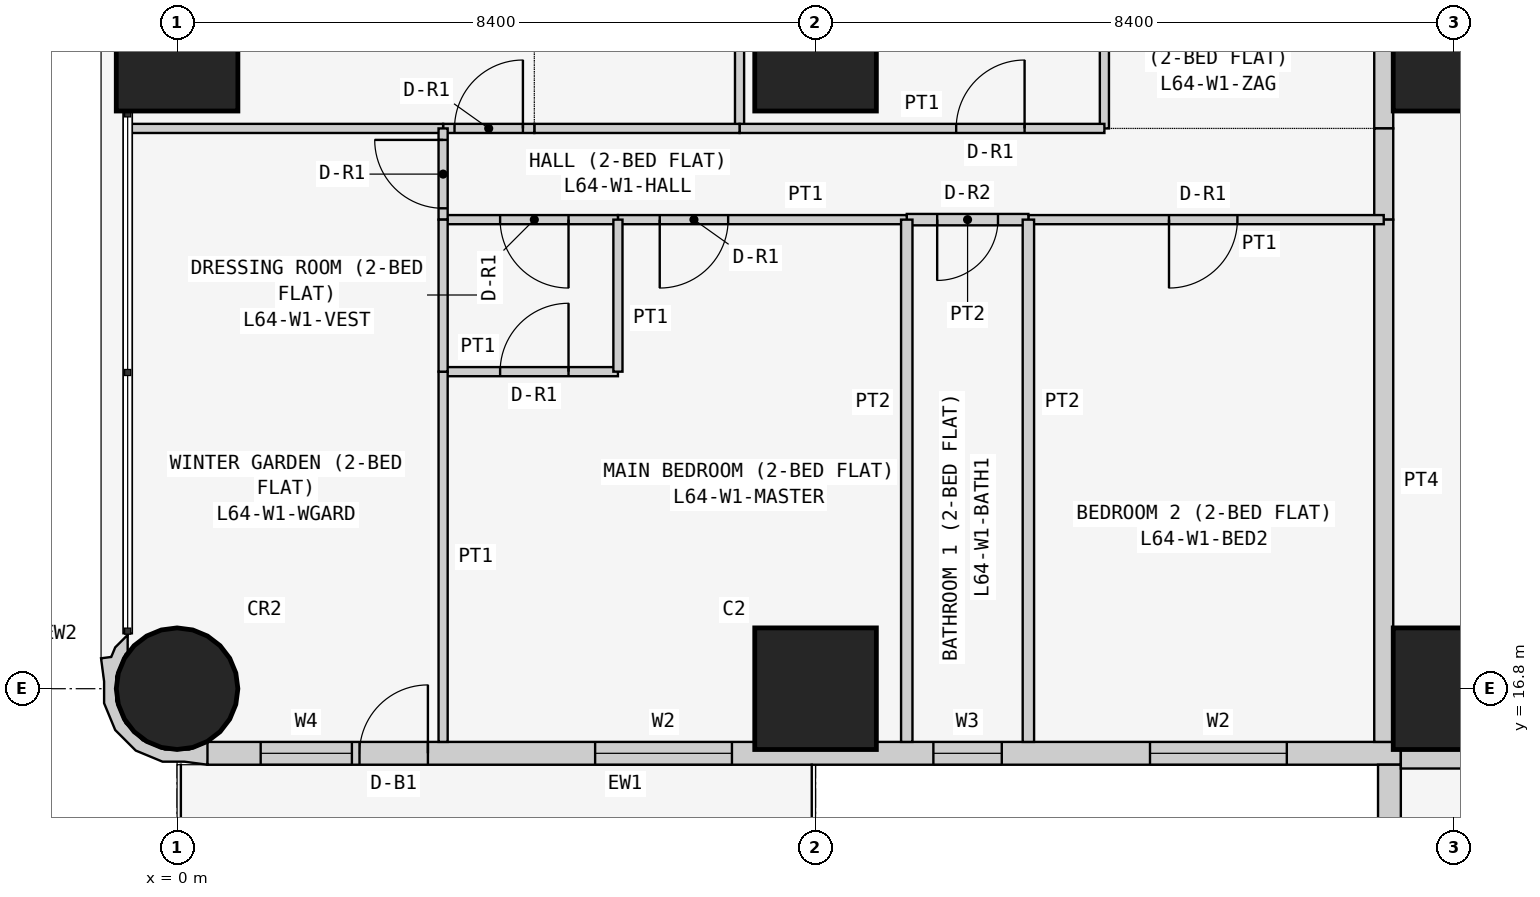
"""IFC4 building model, lengths in metres.
Left out: names, types, materials, properties, quantities, classifications, styles, units other than length and angle.
Written with IfcOpenShell. Run it as: python <this file> out.ifc"""

import sys

from ifc_helpers import new_model, si_unit, direction, frame, frame_2d, origin, origin_2d, place, context, subcontext, project, spatial, polyline, rectangle, circle, outline, extrude, element, fill, save


model = new_model("IFC4")
c1 = context("Model", 3, precision=1e-05, world=origin(), true_north=direction((0.0, 1.0)))
c2 = subcontext(c1, "Body", "Model", "MODEL_VIEW")
j1 = project(units=[si_unit("LENGTHUNIT", "METRE"), si_unit("PLANEANGLEUNIT", "RADIAN")], contexts=[c1])
p1 = place(None, origin())
s1 = spatial("IfcSite", under=j1, at=p1, CompositionType="ELEMENT")
p2 = place(p1, origin())
s2 = spatial("IfcBuilding", under=s1, at=p2, CompositionType="ELEMENT")
p3 = place(p2, frame((0.0, 0.0, 244.5)))
s3 = spatial("IfcBuildingStorey", under=s2, at=p3, CompositionType="ELEMENT", Elevation=244.5)
p4 = place(p3, frame((0.0, 16.8, 0.0), z_axis=(0.0, 0.0, 1.0), x_axis=(1.0, 0.0, 0.0)))
e1 = element("IfcColumn", 1, at=p4, inside=s3, PredefinedType="COLUMN", context=c2, shape_type="SweptSolid", body=[
    extrude(circle(Radius=0.8, at=origin_2d()), origin(), (0.0, 0.0, 1.0), 3.6),
])
for number, where, z_axis, x_axis in (
    (2, (0.0, 25.2, 0.0), (0.0, 0.0, 1.0), (1.0, 0.0, 0.0)),
    (3, (8.4, 16.8, 0.0), (0.0, 0.0, 1.0), (1.0, 0.0, 0.0)),
    (4, (8.4, 25.2, 0.0), (0.0, 0.0, 1.0), (1.0, 0.0, 0.0)),
    (5, (16.8, 16.8, 0.0), (0.0, 0.0, 1.0), (1.0, 0.0, 0.0)),
    (6, (16.8, 25.2, 0.0), (0.0, 0.0, 1.0), (1.0, 0.0, 0.0)),
):
    element("IfcColumn", number, at=place(p3, frame(where, z_axis=z_axis, x_axis=x_axis)), inside=s3, PredefinedType="COLUMN", context=c2, shape_type="SweptSolid", body=[
        extrude(rectangle(XDim=1.6, YDim=1.6, at=origin_2d()), origin(), (0.0, 0.0, 1.0), 3.6),
    ])
p5 = place(p3, frame((0.4, 15.95, 0.0), z_axis=(0.0, 0.0, 1.0), x_axis=(1.0, 0.0, 0.0)))
e7 = element("IfcWall", 7, at=p5, inside=s3, PredefinedType="SOLIDWALL", context=c2, shape_type="SweptSolid", body=[
    extrude(rectangle(XDim=15.7, YDim=0.3, at=frame_2d((7.85, 0.0))), origin(), (0.0, 0.0, 1.0), 3.35),
])
p6 = place(p5, frame((12.4, 0.0, 0.9)))
e8 = element("IfcOpeningElement", 8, at=p6, cuts=e7, PredefinedType="OPENING", context=c2, shape_type="SweptSolid", body=[
    extrude(rectangle(XDim=1.8, YDim=1.5, at=frame_2d((0.9, 0.75))), frame((0.0, 0.16, 0.0), z_axis=(0.0, -1.0, 0.0), x_axis=(1.0, 0.0, 0.0)), (0.0, 0.0, 1.0), 0.32),
])
p7 = place(p5, frame((9.55, 0.0, 1.5)))
e9 = element("IfcOpeningElement", 9, at=p7, cuts=e7, PredefinedType="OPENING", context=c2, shape_type="SweptSolid", body=[
    extrude(rectangle(XDim=0.9, YDim=0.7, at=frame_2d((0.45, 0.35))), frame((0.0, 0.16, 0.0), z_axis=(0.0, -1.0, 0.0), x_axis=(1.0, 0.0, 0.0)), (0.0, 0.0, 1.0), 0.32),
])
p8 = place(p5, frame((5.1, 0.0, 0.9)))
e10 = element("IfcOpeningElement", 10, at=p8, cuts=e7, PredefinedType="OPENING", context=c2, shape_type="SweptSolid", body=[
    extrude(rectangle(XDim=1.8, YDim=1.5, at=frame_2d((0.9, 0.75))), frame((0.0, 0.16, 0.0), z_axis=(0.0, -1.0, 0.0), x_axis=(1.0, 0.0, 0.0)), (0.0, 0.0, 1.0), 0.32),
])
p9 = place(p5, frame((2.0, 0.0, 0.0)))
e11 = element("IfcOpeningElement", 11, at=p9, cuts=e7, PredefinedType="OPENING", context=c2, shape_type="SweptSolid", body=[
    extrude(rectangle(XDim=0.9, YDim=2.4, at=frame_2d((0.45, 1.2))), frame((0.0, 0.16, 0.0), z_axis=(0.0, -1.0, 0.0), x_axis=(1.0, 0.0, 0.0)), (0.0, 0.0, 1.0), 0.32),
])
p10 = place(p5, frame((0.7, 0.0, 0.9)))
e12 = element("IfcOpeningElement", 12, at=p10, cuts=e7, PredefinedType="OPENING", context=c2, shape_type="SweptSolid", body=[
    extrude(rectangle(XDim=1.2, YDim=1.5, at=frame_2d((0.6, 0.75))), frame((0.0, 0.16, 0.0), z_axis=(0.0, -1.0, 0.0), x_axis=(1.0, 0.0, 0.0)), (0.0, 0.0, 1.0), 0.32),
])
p11 = place(p3, frame((15.95, 15.8, 0.0), z_axis=(0.0, 0.0, 1.0), x_axis=(0.0, -1.0, 0.0)))
e13 = element("IfcWall", 13, at=p11, inside=s3, PredefinedType="SOLIDWALL", context=c2, shape_type="SweptSolid", body=[
    extrude(rectangle(XDim=7.0, YDim=0.3, at=frame_2d((3.5, 0.0))), origin(), (0.0, 0.0, 1.0), 3.35),
])
p12 = place(p11, frame((1.5, 0.0, 0.9)))
e14 = element("IfcOpeningElement", 14, at=p12, cuts=e13, PredefinedType="OPENING", context=c2, shape_type="SweptSolid", body=[
    extrude(rectangle(XDim=2.4, YDim=1.5, at=frame_2d((1.2, 0.75))), frame((0.0, 0.16, 0.0), z_axis=(0.0, -1.0, 0.0), x_axis=(1.0, 0.0, 0.0)), (0.0, 0.0, 1.0), 0.32),
])
p13 = place(p11, frame((5.05, 0.0, 0.9)))
e15 = element("IfcOpeningElement", 15, at=p13, cuts=e13, PredefinedType="OPENING", context=c2, shape_type="SweptSolid", body=[
    extrude(rectangle(XDim=1.2, YDim=1.5, at=frame_2d((0.6, 0.75))), frame((0.0, 0.16, 0.0), z_axis=(0.0, -1.0, 0.0), x_axis=(1.0, 0.0, 0.0)), (0.0, 0.0, 1.0), 0.32),
])
p14 = place(p3, frame((-0.595, 17.448, 0.0), z_axis=(0.0, 0.0, 1.0), x_axis=(-0.93923434088, -0.343276641956, 0.0)))
e16 = element("IfcWall", 16, at=p14, inside=s3, PredefinedType="SOLIDWALL", context=c2, shape_type="SweptSolid", body=[
    extrude(outline(polyline([(-0.369, 1.89), (-0.509, 1.621), (-0.491, 1.614), (-0.479, 1.609), (-0.211, 1.62), (0.088, 1.511), (0.323, 1.295), (0.457, 1.006), (0.47, 0.688), (0.361, 0.389), (0.146, 0.154), (0.108, 0.137), (0.031, -0.075), (0.241, 0.023), (0.334, 0.124), (0.465, 0.094), (0.532, 0.393), (0.631, 0.663), (0.614, 1.045), (0.453, 1.391), (0.172, 1.649), (-0.098, 1.748), (-0.369, 1.89)])), origin(), (0.0, 0.0, 1.0), 3.35),
])
p15 = place(p3, frame((22.971, 15.875, 0.0), z_axis=(0.0, 0.0, 1.0), x_axis=(-1.0, 0.0, 0.0)))
e17 = element("IfcWall", 17, at=p15, inside=s3, PredefinedType="PARTITIONING", context=c2, shape_type="SweptSolid", body=[
    extrude(rectangle(XDim=6.871, YDim=0.25, at=frame_2d((3.436, 0.0))), origin(), (0.0, 0.0, 1.0), 3.35),
])
p16 = place(p3, frame((15.875, 24.171, 0.0), z_axis=(0.0, 0.0, 1.0), x_axis=(0.0, 1.0, 0.0)))
e18 = element("IfcWall", 18, at=p16, inside=s3, PredefinedType="PARTITIONING", context=c2, shape_type="SweptSolid", body=[
    extrude(rectangle(XDim=5.229, YDim=0.25, at=frame_2d((2.615, 0.0))), origin(), (0.0, 0.0, 1.0), 3.35),
])
p17 = place(p16, frame((2.129, 0.0, 0.0)))
e19 = element("IfcOpeningElement", 19, at=p17, cuts=e18, PredefinedType="OPENING", context=c2, shape_type="SweptSolid", body=[
    extrude(rectangle(XDim=1.0, YDim=2.1, at=frame_2d((0.5, 1.05))), frame((0.0, 0.135, 0.0), z_axis=(0.0, -1.0, 0.0), x_axis=(1.0, 0.0, 0.0)), (0.0, 0.0, 1.0), 0.27),
])
p18 = place(p3, frame((15.875, 22.971, 0.0), z_axis=(0.0, 0.0, 1.0), x_axis=(0.0, 1.0, 0.0)))
e20 = element("IfcWall", 20, at=p18, inside=s3, PredefinedType="PARTITIONING", context=c2, shape_type="SweptSolid", body=[
    extrude(rectangle(XDim=1.2, YDim=0.25, at=frame_2d((0.6, 0.0))), origin(), (0.0, 0.0, 1.0), 3.35),
])
p19 = place(p3, frame((15.875, 16.1, 0.0), z_axis=(0.0, 0.0, 1.0), x_axis=(0.0, 1.0, 0.0)))
e21 = element("IfcWall", 21, at=p19, inside=s3, PredefinedType="PARTITIONING", context=c2, shape_type="SweptSolid", body=[
    extrude(rectangle(XDim=6.871, YDim=0.25, at=frame_2d((3.436, 0.0))), origin(), (0.0, 0.0, 1.0), 3.35),
])
for number, where, z_axis, x_axis in (
    (22, (12.2, 29.4, 0.0), (0.0, 0.0, 1.0), (0.0, -1.0, 0.0)),
    (23, (7.4, 29.4, 0.0), (0.0, 0.0, 1.0), (0.0, -1.0, 0.0)),
):
    element("IfcWall", number, at=place(p3, frame(where, z_axis=z_axis, x_axis=x_axis)), inside=s3, PredefinedType="PARTITIONING", context=c2, shape_type="SweptSolid", body=[
        extrude(rectangle(XDim=5.229, YDim=0.12, at=frame_2d((2.615, 0.0))), origin(), (0.0, 0.0, 1.0), 3.35),
    ])
p20 = place(p3, frame((7.4, 24.171, 0.0), z_axis=(0.0, 0.0, 1.0), x_axis=(1.0, 0.0, 0.0)))
e24 = element("IfcWall", 24, at=p20, inside=s3, PredefinedType="PARTITIONING", context=c2, shape_type="SweptSolid", body=[
    extrude(rectangle(XDim=4.8, YDim=0.12, at=frame_2d((2.4, 0.0))), origin(), (0.0, 0.0, 1.0), 3.35),
])
p21 = place(p20, frame((2.85, 0.0, 0.0)))
e25 = element("IfcOpeningElement", 25, at=p21, cuts=e24, PredefinedType="OPENING", context=c2, shape_type="SweptSolid", body=[
    extrude(rectangle(XDim=0.9, YDim=2.1, at=frame_2d((0.45, 1.05))), frame((0.0, 0.07, 0.0), z_axis=(0.0, -1.0, 0.0), x_axis=(1.0, 0.0, 0.0)), (0.0, 0.0, 1.0), 0.14),
])
p22 = place(p3, frame((4.7, 24.171, 0.0), z_axis=(0.0, 0.0, 1.0), x_axis=(1.0, 0.0, 0.0)))
e26 = element("IfcWall", 26, at=p22, inside=s3, PredefinedType="PARTITIONING", context=c2, shape_type="SweptSolid", body=[
    extrude(rectangle(XDim=2.7, YDim=0.12, at=frame_2d((1.35, 0.0))), origin(), (0.0, 0.0, 1.0), 3.35),
])
p23 = place(p3, frame((3.5, 24.171, 0.0), z_axis=(0.0, 0.0, 1.0), x_axis=(1.0, 0.0, 0.0)))
e27 = element("IfcWall", 27, at=p23, inside=s3, PredefinedType="PARTITIONING", context=c2, shape_type="SweptSolid", body=[
    extrude(rectangle(XDim=1.2, YDim=0.12, at=frame_2d((0.6, 0.0))), origin(), (0.0, 0.0, 1.0), 3.35),
])
p24 = place(p23, frame((0.15, 0.0, 0.0)))
e28 = element("IfcOpeningElement", 28, at=p24, cuts=e27, PredefinedType="OPENING", context=c2, shape_type="SweptSolid", body=[
    extrude(rectangle(XDim=0.9, YDim=2.1, at=frame_2d((0.45, 1.05))), frame((0.0, 0.07, 0.0), z_axis=(0.0, -1.0, 0.0), x_axis=(1.0, 0.0, 0.0)), (0.0, 0.0, 1.0), 0.14),
])
p25 = place(p3, frame((-0.65, 24.171, 0.0), z_axis=(0.0, 0.0, 1.0), x_axis=(1.0, 0.0, 0.0)))
e29 = element("IfcWall", 29, at=p25, inside=s3, PredefinedType="PARTITIONING", context=c2, shape_type="SweptSolid", body=[
    extrude(rectangle(XDim=4.15, YDim=0.12, at=frame_2d((2.075, 0.0))), origin(), (0.0, 0.0, 1.0), 3.35),
])
p26 = place(p3, frame((11.2, 22.971, 0.0), z_axis=(0.0, 0.0, 1.0), x_axis=(1.0, 0.0, 0.0)))
e30 = element("IfcWall", 30, at=p26, inside=s3, PredefinedType="PARTITIONING", context=c2, shape_type="SweptSolid", body=[
    extrude(rectangle(XDim=4.675, YDim=0.12, at=frame_2d((2.337, 0.0))), origin(), (0.0, 0.0, 1.0), 3.35),
])
p27 = place(p26, frame((1.85, 0.0, 0.0)))
e31 = element("IfcOpeningElement", 31, at=p27, cuts=e30, PredefinedType="OPENING", context=c2, shape_type="SweptSolid", body=[
    extrude(rectangle(XDim=0.9, YDim=2.1, at=frame_2d((0.45, 1.05))), frame((0.0, 0.07, 0.0), z_axis=(0.0, -1.0, 0.0), x_axis=(1.0, 0.0, 0.0)), (0.0, 0.0, 1.0), 0.14),
])
p28 = place(p3, frame((9.6, 22.971, 0.0), z_axis=(0.0, 0.0, 1.0), x_axis=(1.0, 0.0, 0.0)))
e32 = element("IfcWall", 32, at=p28, inside=s3, PredefinedType="PARTITIONING", context=c2, shape_type="SweptSolid", body=[
    extrude(rectangle(XDim=1.6, YDim=0.15, at=frame_2d((0.8, 0.0))), origin(), (0.0, 0.0, 1.0), 3.35),
])
p29 = place(p28, frame((0.4, 0.0, 0.0)))
e33 = element("IfcOpeningElement", 33, at=p29, cuts=e32, PredefinedType="OPENING", context=c2, shape_type="SweptSolid", body=[
    extrude(rectangle(XDim=0.8, YDim=2.1, at=frame_2d((0.4, 1.05))), frame((0.0, 0.085, 0.0), z_axis=(0.0, -1.0, 0.0), x_axis=(1.0, 0.0, 0.0)), (0.0, 0.0, 1.0), 0.17),
])
p30 = place(p3, frame((5.8, 22.971, 0.0), z_axis=(0.0, 0.0, 1.0), x_axis=(1.0, 0.0, 0.0)))
e34 = element("IfcWall", 34, at=p30, inside=s3, PredefinedType="PARTITIONING", context=c2, shape_type="SweptSolid", body=[
    extrude(rectangle(XDim=3.8, YDim=0.12, at=frame_2d((1.9, 0.0))), origin(), (0.0, 0.0, 1.0), 3.35),
])
p31 = place(p30, frame((0.55, 0.0, 0.0)))
e35 = element("IfcOpeningElement", 35, at=p31, cuts=e34, PredefinedType="OPENING", context=c2, shape_type="SweptSolid", body=[
    extrude(rectangle(XDim=0.9, YDim=2.1, at=frame_2d((0.45, 1.05))), frame((0.0, 0.07, 0.0), z_axis=(0.0, -1.0, 0.0), x_axis=(1.0, 0.0, 0.0)), (0.0, 0.0, 1.0), 0.14),
])
p32 = place(p3, frame((3.5, 22.971, 0.0), z_axis=(0.0, 0.0, 1.0), x_axis=(1.0, 0.0, 0.0)))
e36 = element("IfcWall", 36, at=p32, inside=s3, PredefinedType="PARTITIONING", context=c2, shape_type="SweptSolid", body=[
    extrude(rectangle(XDim=2.3, YDim=0.12, at=frame_2d((1.15, 0.0))), origin(), (0.0, 0.0, 1.0), 3.35),
])
p33 = place(p32, frame((0.75, 0.0, 0.0)))
e37 = element("IfcOpeningElement", 37, at=p33, cuts=e36, PredefinedType="OPENING", context=c2, shape_type="SweptSolid", body=[
    extrude(rectangle(XDim=0.9, YDim=2.1, at=frame_2d((0.45, 1.05))), frame((0.0, 0.07, 0.0), z_axis=(0.0, -1.0, 0.0), x_axis=(1.0, 0.0, 0.0)), (0.0, 0.0, 1.0), 0.14),
])
p34 = place(p3, frame((3.5, 24.171, 0.0), z_axis=(0.0, 0.0, 1.0), x_axis=(0.0, -1.0, 0.0)))
e38 = element("IfcWall", 38, at=p34, inside=s3, PredefinedType="PARTITIONING", context=c2, shape_type="SweptSolid", body=[
    extrude(rectangle(XDim=1.2, YDim=0.12, at=frame_2d((0.6, 0.0))), origin(), (0.0, 0.0, 1.0), 3.35),
])
p35 = place(p34, frame((0.151, 0.0, 0.0)))
e39 = element("IfcOpeningElement", 39, at=p35, cuts=e38, PredefinedType="OPENING", context=c2, shape_type="SweptSolid", body=[
    extrude(rectangle(XDim=0.9, YDim=2.1, at=frame_2d((0.45, 1.05))), frame((0.0, 0.07, 0.0), z_axis=(0.0, -1.0, 0.0), x_axis=(1.0, 0.0, 0.0)), (0.0, 0.0, 1.0), 0.14),
])
for number, where, z_axis, x_axis in (
    (40, (11.2, 22.971, 0.0), (0.0, 0.0, 1.0), (0.0, -1.0, 0.0)),
    (41, (9.6, 22.971, 0.0), (0.0, 0.0, 1.0), (0.0, -1.0, 0.0)),
):
    element("IfcWall", number, at=place(p3, frame(where, z_axis=z_axis, x_axis=x_axis)), inside=s3, PredefinedType="PARTITIONING", context=c2, shape_type="SweptSolid", body=[
        extrude(rectangle(XDim=6.871, YDim=0.15, at=frame_2d((3.436, 0.0))), origin(), (0.0, 0.0, 1.0), 3.35),
    ])
p36 = place(p3, frame((3.5, 20.971, 0.0), z_axis=(0.0, 0.0, 1.0), x_axis=(1.0, 0.0, 0.0)))
e42 = element("IfcWall", 42, at=p36, inside=s3, PredefinedType="PARTITIONING", context=c2, shape_type="SweptSolid", body=[
    extrude(rectangle(XDim=2.3, YDim=0.12, at=frame_2d((1.15, 0.0))), origin(), (0.0, 0.0, 1.0), 3.35),
])
p37 = place(p36, frame((0.75, 0.0, 0.0)))
e43 = element("IfcOpeningElement", 43, at=p37, cuts=e42, PredefinedType="OPENING", context=c2, shape_type="SweptSolid", body=[
    extrude(rectangle(XDim=0.9, YDim=2.1, at=frame_2d((0.45, 1.05))), frame((0.0, 0.07, 0.0), z_axis=(0.0, -1.0, 0.0), x_axis=(1.0, 0.0, 0.0)), (0.0, 0.0, 1.0), 0.14),
])
p38 = place(p3, frame((5.8, 20.971, 0.0), z_axis=(0.0, 0.0, 1.0), x_axis=(0.0, 1.0, 0.0)))
e44 = element("IfcWall", 44, at=p38, inside=s3, PredefinedType="PARTITIONING", context=c2, shape_type="SweptSolid", body=[
    extrude(rectangle(XDim=2.0, YDim=0.12, at=frame_2d((1.0, 0.0))), origin(), (0.0, 0.0, 1.0), 3.35),
])
p39 = place(p3, frame((3.5, 16.1, 0.0), z_axis=(0.0, 0.0, 1.0), x_axis=(0.0, 1.0, 0.0)))
e45 = element("IfcWall", 45, at=p39, inside=s3, PredefinedType="PARTITIONING", context=c2, shape_type="SweptSolid", body=[
    extrude(rectangle(XDim=4.871, YDim=0.12, at=frame_2d((2.436, 0.0))), origin(), (0.0, 0.0, 1.0), 3.35),
])
p40 = place(p3, frame((3.5, 22.971, 0.0), z_axis=(0.0, 0.0, 1.0), x_axis=(0.0, -1.0, 0.0)))
e46 = element("IfcWall", 46, at=p40, inside=s3, PredefinedType="PARTITIONING", context=c2, shape_type="SweptSolid", body=[
    extrude(rectangle(XDim=2.0, YDim=0.12, at=frame_2d((1.0, 0.0))), origin(), (0.0, 0.0, 1.0), 3.35),
])
p41 = place(p6, origin())
e47 = element("IfcWindow", 47, at=p41, inside=s3, PartitioningType="SINGLE_PANEL", PredefinedType="WINDOW", context=c2, shape_type="SweptSolid", body=[
    extrude(rectangle(XDim=1.8, YDim=1.5, at=frame_2d((0.9, 0.75))), frame((0.0, 0.03, 0.0), z_axis=(0.0, -1.0, 0.0), x_axis=(1.0, 0.0, 0.0)), (0.0, 0.0, 1.0), 0.06),
])
fill(e8, e47)
p42 = place(p7, origin())
e48 = element("IfcWindow", 48, at=p42, inside=s3, PartitioningType="SINGLE_PANEL", PredefinedType="WINDOW", context=c2, shape_type="SweptSolid", body=[
    extrude(rectangle(XDim=0.9, YDim=0.7, at=frame_2d((0.45, 0.35))), frame((0.0, 0.03, 0.0), z_axis=(0.0, -1.0, 0.0), x_axis=(1.0, 0.0, 0.0)), (0.0, 0.0, 1.0), 0.06),
])
fill(e9, e48)
p43 = place(p8, origin())
e49 = element("IfcWindow", 49, at=p43, inside=s3, PartitioningType="SINGLE_PANEL", PredefinedType="WINDOW", context=c2, shape_type="SweptSolid", body=[
    extrude(rectangle(XDim=1.8, YDim=1.5, at=frame_2d((0.9, 0.75))), frame((0.0, 0.03, 0.0), z_axis=(0.0, -1.0, 0.0), x_axis=(1.0, 0.0, 0.0)), (0.0, 0.0, 1.0), 0.06),
])
fill(e10, e49)
p44 = place(p9, origin())
e50 = element("IfcDoor", 50, at=p44, inside=s3, OperationType="SINGLE_SWING_RIGHT", PredefinedType="DOOR", context=c2, shape_type="SweptSolid", body=[
    extrude(rectangle(XDim=0.9, YDim=2.4, at=frame_2d((0.45, 1.2))), frame((0.0, 0.025, 0.0), z_axis=(0.0, -1.0, 0.0), x_axis=(1.0, 0.0, 0.0)), (0.0, 0.0, 1.0), 0.05),
])
fill(e11, e50)
p45 = place(p10, origin())
e51 = element("IfcWindow", 51, at=p45, inside=s3, PartitioningType="SINGLE_PANEL", PredefinedType="WINDOW", context=c2, shape_type="SweptSolid", body=[
    extrude(rectangle(XDim=1.2, YDim=1.5, at=frame_2d((0.6, 0.75))), frame((0.0, 0.03, 0.0), z_axis=(0.0, -1.0, 0.0), x_axis=(1.0, 0.0, 0.0)), (0.0, 0.0, 1.0), 0.06),
])
fill(e12, e51)
p46 = place(p21, origin())
e52 = element("IfcDoor", 52, at=p46, inside=s3, OperationType="SINGLE_SWING_RIGHT", PredefinedType="DOOR", context=c2, shape_type="SweptSolid", body=[
    extrude(rectangle(XDim=0.9, YDim=2.1, at=frame_2d((0.45, 1.05))), frame((0.0, 0.025, 0.0), z_axis=(0.0, -1.0, 0.0), x_axis=(1.0, 0.0, 0.0)), (0.0, 0.0, 1.0), 0.05),
])
fill(e25, e52)
p47 = place(p24, origin())
e53 = element("IfcDoor", 53, at=p47, inside=s3, OperationType="SINGLE_SWING_RIGHT", PredefinedType="DOOR", context=c2, shape_type="SweptSolid", body=[
    extrude(rectangle(XDim=0.9, YDim=2.1, at=frame_2d((0.45, 1.05))), frame((0.0, 0.025, 0.0), z_axis=(0.0, -1.0, 0.0), x_axis=(1.0, 0.0, 0.0)), (0.0, 0.0, 1.0), 0.05),
])
fill(e28, e53)
p48 = place(p27, frame((0.9, 0.0, 0.0), z_axis=(0.0, 0.0, 1.0), x_axis=(-1.0, 0.0, 0.0)))
e54 = element("IfcDoor", 54, at=p48, inside=s3, OperationType="SINGLE_SWING_RIGHT", PredefinedType="DOOR", context=c2, shape_type="SweptSolid", body=[
    extrude(rectangle(XDim=0.9, YDim=2.1, at=frame_2d((0.45, 1.05))), frame((0.0, 0.025, 0.0), z_axis=(0.0, -1.0, 0.0), x_axis=(1.0, 0.0, 0.0)), (0.0, 0.0, 1.0), 0.05),
])
fill(e31, e54)
p49 = place(p29, frame((0.8, 0.0, 0.0), z_axis=(0.0, 0.0, 1.0), x_axis=(-1.0, 0.0, 0.0)))
e55 = element("IfcDoor", 55, at=p49, inside=s3, OperationType="SINGLE_SWING_RIGHT", PredefinedType="DOOR", context=c2, shape_type="SweptSolid", body=[
    extrude(rectangle(XDim=0.8, YDim=2.1, at=frame_2d((0.4, 1.05))), frame((0.0, 0.025, 0.0), z_axis=(0.0, -1.0, 0.0), x_axis=(1.0, 0.0, 0.0)), (0.0, 0.0, 1.0), 0.05),
])
fill(e33, e55)
p50 = place(p31, frame((0.9, 0.0, 0.0), z_axis=(0.0, 0.0, 1.0), x_axis=(-1.0, 0.0, 0.0)))
e56 = element("IfcDoor", 56, at=p50, inside=s3, OperationType="SINGLE_SWING_RIGHT", PredefinedType="DOOR", context=c2, shape_type="SweptSolid", body=[
    extrude(rectangle(XDim=0.9, YDim=2.1, at=frame_2d((0.45, 1.05))), frame((0.0, 0.025, 0.0), z_axis=(0.0, -1.0, 0.0), x_axis=(1.0, 0.0, 0.0)), (0.0, 0.0, 1.0), 0.05),
])
fill(e35, e56)
p51 = place(p33, frame((0.9, 0.0, 0.0), z_axis=(0.0, 0.0, 1.0), x_axis=(-1.0, 0.0, 0.0)))
e57 = element("IfcDoor", 57, at=p51, inside=s3, OperationType="SINGLE_SWING_LEFT", PredefinedType="DOOR", context=c2, shape_type="SweptSolid", body=[
    extrude(rectangle(XDim=0.9, YDim=2.1, at=frame_2d((0.45, 1.05))), frame((0.0, 0.025, 0.0), z_axis=(0.0, -1.0, 0.0), x_axis=(1.0, 0.0, 0.0)), (0.0, 0.0, 1.0), 0.05),
])
fill(e37, e57)
p52 = place(p37, origin())
e58 = element("IfcDoor", 58, at=p52, inside=s3, OperationType="SINGLE_SWING_RIGHT", PredefinedType="DOOR", context=c2, shape_type="SweptSolid", body=[
    extrude(rectangle(XDim=0.9, YDim=2.1, at=frame_2d((0.45, 1.05))), frame((0.0, 0.025, 0.0), z_axis=(0.0, -1.0, 0.0), x_axis=(1.0, 0.0, 0.0)), (0.0, 0.0, 1.0), 0.05),
])
fill(e43, e58)
p53 = place(p35, frame((0.9, 0.0, 0.0), z_axis=(0.0, 0.0, 1.0), x_axis=(-1.0, 0.0, 0.0)))
e59 = element("IfcDoor", 59, at=p53, inside=s3, OperationType="SINGLE_SWING_RIGHT", PredefinedType="DOOR", context=c2, shape_type="SweptSolid", body=[
    extrude(rectangle(XDim=0.9, YDim=2.1, at=frame_2d((0.45, 1.05))), frame((0.0, 0.025, 0.0), z_axis=(0.0, -1.0, 0.0), x_axis=(1.0, 0.0, 0.0)), (0.0, 0.0, 1.0), 0.05),
])
fill(e39, e59)
save(model, sys.argv[1])
